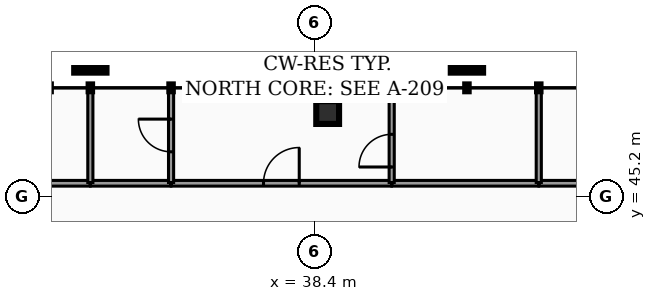
"""IFC4 building model, lengths in metres.
Left out: names, types, materials, properties, quantities, classifications, styles, units other than length and angle.
Written with IfcOpenShell. Run it as: python <this file> out.ifc"""

import sys

from ifc_helpers import new_model, si_unit, direction, frame, frame_2d, origin, origin_2d, place, context, subcontext, project, spatial, rectangle, hollow_rectangle, extrude, element, fill, save


model = new_model("IFC4")
c1 = context("Model", 3, precision=1e-05, world=origin(), true_north=direction((0.0, 1.0)))
c2 = subcontext(c1, "Body", "Model", "MODEL_VIEW")
j1 = project(units=[si_unit("LENGTHUNIT", "METRE"), si_unit("PLANEANGLEUNIT", "RADIAN")], contexts=[c1])
p1 = place(None, origin())
s1 = spatial("IfcSite", under=j1, at=p1, CompositionType="ELEMENT")
p2 = place(p1, origin())
s2 = spatial("IfcBuilding", under=s1, at=p2, CompositionType="ELEMENT")
p3 = place(p2, frame((0.0, 0.0, 246.16)))
s3 = spatial("IfcBuildingStorey", under=s2, at=p3, CompositionType="ELEMENT", Elevation=246.16)
p4 = place(p3, frame((38.745, 47.411, 0.0), z_axis=(-0.005677033238, -0.036670566053, 0.999311283274), x_axis=(0.98822785309, -0.152989249223, 0.0)))
e1 = element("IfcColumn", 1, at=p4, inside=s3, PredefinedType="COLUMN", context=c2, shape_type="SweptSolid", body=[
    extrude(hollow_rectangle(XDim=0.6, YDim=0.6, WallThickness=0.03, at=origin_2d()), origin(), (0.0, 0.0, 1.0), 3.182),
])
p5 = place(p3, frame((28.55, 45.55, 0.0), z_axis=(0.0, 0.0, 1.0), x_axis=(1.0, 0.0, 0.0)))
e2 = element("IfcWall", 2, at=p5, inside=s3, PredefinedType="PARTITIONING", context=c2, shape_type="SweptSolid", body=[
    extrude(rectangle(XDim=3.945, YDim=0.15, at=frame_2d((1.973, 0.0))), origin(), (0.0, 0.0, 1.0), 2.235),
])
p6 = place(p3, frame((44.305, 45.55, 0.0), z_axis=(0.0, 0.0, 1.0), x_axis=(1.0, 0.0, 0.0)))
e3 = element("IfcWall", 3, at=p6, inside=s3, PredefinedType="PARTITIONING", context=c2, shape_type="SweptSolid", body=[
    extrude(rectangle(XDim=4.045, YDim=0.15, at=frame_2d((2.022, 0.0))), origin(), (0.0, 0.0, 1.0), 2.235),
])
p7 = place(p3, frame((34.629, 45.55, 0.0), z_axis=(0.0, 0.0, 1.0), x_axis=(1.0, 0.0, 0.0)))
e4 = element("IfcWall", 4, at=p7, inside=s3, PredefinedType="PARTITIONING", context=c2, shape_type="SweptSolid", body=[
    extrude(rectangle(XDim=5.796, YDim=0.15, at=frame_2d((2.898, 0.0))), origin(), (0.0, 0.0, 1.0), 2.235),
])
p8 = place(p7, frame((2.428, 0.0, 0.0)))
e5 = element("IfcOpeningElement", 5, at=p8, cuts=e4, PredefinedType="OPENING", context=c2, shape_type="SweptSolid", body=[
    extrude(rectangle(XDim=0.94, YDim=2.05, at=frame_2d((0.47, 1.025))), frame((0.0, 0.085, 0.0), z_axis=(0.0, -1.0, 0.0), x_axis=(1.0, 0.0, 0.0)), (0.0, 0.0, 1.0), 0.17),
])
p9 = place(p3, frame((40.435, 45.55, 0.0), z_axis=(0.0, 0.0, 1.0), x_axis=(1.0, 0.0, 0.0)))
e6 = element("IfcWall", 6, at=p9, inside=s3, PredefinedType="PARTITIONING", context=c2, shape_type="SweptSolid", body=[
    extrude(rectangle(XDim=3.86, YDim=0.15, at=frame_2d((1.93, 0.0))), origin(), (0.0, 0.0, 1.0), 2.235),
])
p10 = place(p3, frame((32.505, 45.55, 0.0), z_axis=(0.0, 0.0, 1.0), x_axis=(1.0, 0.0, 0.0)))
e7 = element("IfcWall", 7, at=p10, inside=s3, PredefinedType="PARTITIONING", context=c2, shape_type="SweptSolid", body=[
    extrude(rectangle(XDim=2.114, YDim=0.15, at=frame_2d((1.057, 0.0))), origin(), (0.0, 0.0, 1.0), 2.235),
])
for number, where, z_axis, x_axis in (
    (8, (32.5, 45.57, 0.0), (0.0, 0.0, 1.0), (0.0, 1.0, 0.0)),
    (9, (44.3, 45.57, 0.0), (0.0, 0.0, 1.0), (0.0, 1.0, 0.0)),
):
    element("IfcWall", number, at=place(p3, frame(where, z_axis=z_axis, x_axis=x_axis)), inside=s3, PredefinedType="PARTITIONING", context=c2, shape_type="SweptSolid", body=[
        extrude(rectangle(XDim=2.476, YDim=0.135, at=frame_2d((1.238, 0.0))), origin(), (0.0, 0.0, 1.0), 2.235),
    ])
p11 = place(p3, frame((40.43, 45.57, 0.0), z_axis=(0.0, 0.0, 1.0), x_axis=(0.0, 1.0, 0.0)))
e10 = element("IfcWall", 10, at=p11, inside=s3, PredefinedType="PARTITIONING", context=c2, shape_type="SweptSolid", body=[
    extrude(rectangle(XDim=2.476, YDim=0.135, at=frame_2d((1.238, 0.0))), origin(), (0.0, 0.0, 1.0), 2.235),
])
p12 = place(p11, frame((0.408, 0.0, 0.0)))
e11 = element("IfcOpeningElement", 11, at=p12, cuts=e10, PredefinedType="OPENING", context=c2, shape_type="SweptSolid", body=[
    extrude(rectangle(XDim=0.86, YDim=2.05, at=frame_2d((0.43, 1.025))), frame((0.0, 0.077, 0.0), z_axis=(0.0, -1.0, 0.0), x_axis=(1.0, 0.0, 0.0)), (0.0, 0.0, 1.0), 0.155),
])
p13 = place(p3, frame((34.624, 45.57, 0.0), z_axis=(0.0, 0.0, 1.0), x_axis=(0.0, 1.0, 0.0)))
e12 = element("IfcWall", 12, at=p13, inside=s3, PredefinedType="PARTITIONING", context=c2, shape_type="SweptSolid", body=[
    extrude(rectangle(XDim=2.476, YDim=0.135, at=frame_2d((1.238, 0.0))), origin(), (0.0, 0.0, 1.0), 2.235),
])
p14 = place(p13, frame((0.808, 0.0, 0.0)))
e13 = element("IfcOpeningElement", 13, at=p14, cuts=e12, PredefinedType="OPENING", context=c2, shape_type="SweptSolid", body=[
    extrude(rectangle(XDim=0.86, YDim=2.05, at=frame_2d((0.43, 1.025))), frame((0.0, 0.077, 0.0), z_axis=(0.0, -1.0, 0.0), x_axis=(1.0, 0.0, 0.0)), (0.0, 0.0, 1.0), 0.155),
])
p15 = place(p8, origin())
e14 = element("IfcDoor", 14, at=p15, inside=s3, OperationType="SINGLE_SWING_RIGHT", PredefinedType="DOOR", context=c2, shape_type="SweptSolid", body=[
    extrude(rectangle(XDim=0.94, YDim=2.05, at=frame_2d((0.47, 1.025))), frame((0.0, 0.025, 0.0), z_axis=(0.0, -1.0, 0.0), x_axis=(1.0, 0.0, 0.0)), (0.0, 0.0, 1.0), 0.05),
])
fill(e5, e14)
p16 = place(p12, origin())
e15 = element("IfcDoor", 15, at=p16, inside=s3, OperationType="SINGLE_SWING_LEFT", PredefinedType="DOOR", context=c2, shape_type="SweptSolid", body=[
    extrude(rectangle(XDim=0.86, YDim=2.05, at=frame_2d((0.43, 1.025))), frame((0.0, 0.025, 0.0), z_axis=(0.0, -1.0, 0.0), x_axis=(1.0, 0.0, 0.0)), (0.0, 0.0, 1.0), 0.05),
])
fill(e11, e15)
p17 = place(p14, origin())
e16 = element("IfcDoor", 16, at=p17, inside=s3, OperationType="SINGLE_SWING_RIGHT", PredefinedType="DOOR", context=c2, shape_type="SweptSolid", body=[
    extrude(rectangle(XDim=0.86, YDim=2.05, at=frame_2d((0.43, 1.025))), frame((0.0, 0.025, 0.0), z_axis=(0.0, -1.0, 0.0), x_axis=(1.0, 0.0, 0.0)), (0.0, 0.0, 1.0), 0.05),
])
fill(e13, e16)
save(model, sys.argv[1])
